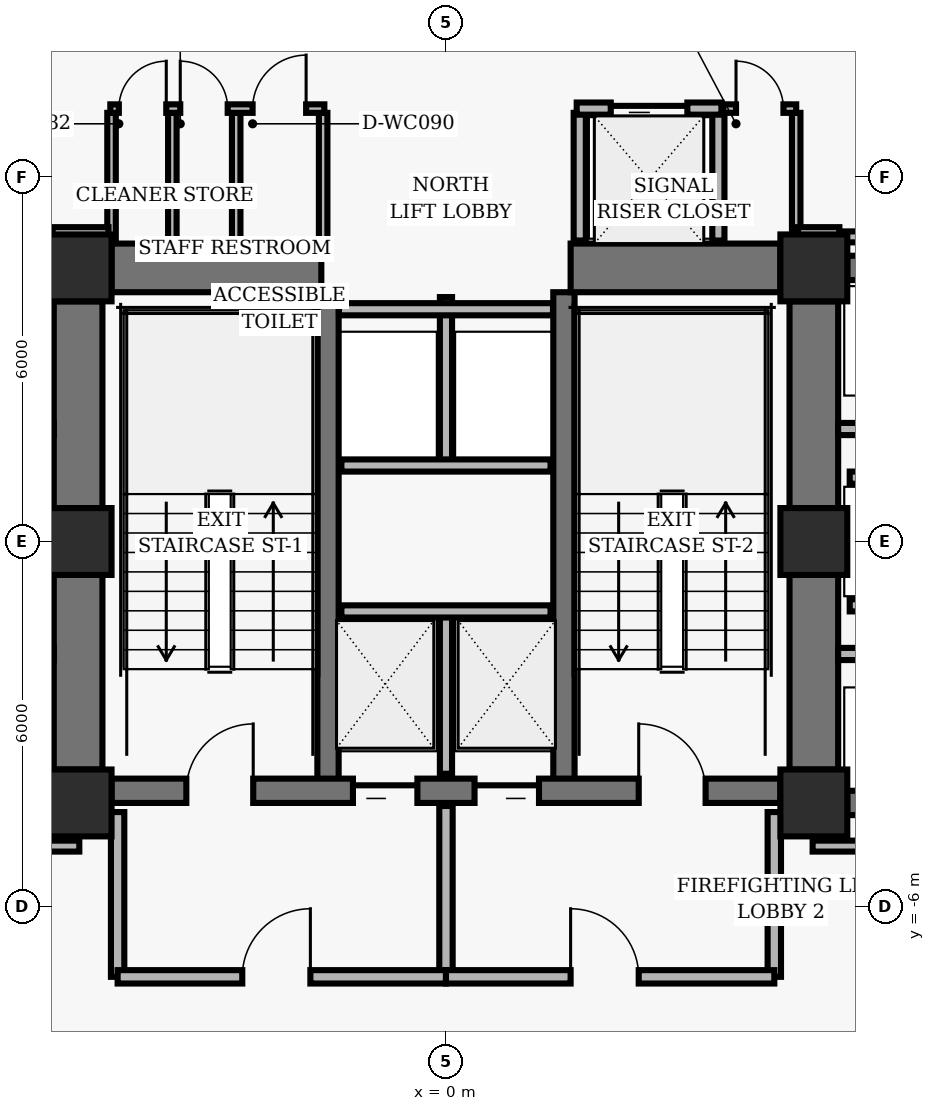
"""IFC4 building model, lengths in metres.
Left out: names, types, materials, properties, quantities, classifications, styles, units other than length and angle.
Written with IfcOpenShell. Run it as: python <this file> out.ifc"""

import sys

from ifc_helpers import new_model, si_unit, direction, frame, frame_2d, origin, origin_2d, place, context, subcontext, project, spatial, rectangle, hollow_rectangle, extrude, element, fill, save


model = new_model("IFC4")
c1 = context("Model", 3, precision=1e-05, world=origin(), true_north=direction((0.0, 1.0)))
c2 = subcontext(c1, "Body", "Model", "MODEL_VIEW")
j1 = project(units=[si_unit("LENGTHUNIT", "METRE"), si_unit("PLANEANGLEUNIT", "RADIAN")], contexts=[c1])
p1 = place(None, origin())
s1 = spatial("IfcSite", under=j1, at=p1, CompositionType="ELEMENT")
p2 = place(p1, origin())
s2 = spatial("IfcBuilding", under=s1, at=p2, CompositionType="ELEMENT")
p3 = place(p2, frame((0.0, 0.0, 11.84)))
s3 = spatial("IfcBuildingStorey", under=s2, at=p3, CompositionType="ELEMENT", Elevation=11.84)
for number, where, z_axis, x_axis in (
    (1, (-6.05, 4.5, 0.0), (0.0, 0.0, 1.0), (1.0, 0.0, 0.0)),
    (2, (6.05, 4.5, 0.0), (0.0, 0.0, 1.0), (1.0, 0.0, 0.0)),
    (3, (-6.05, 0.0, 0.0), (0.0, 0.0, 1.0), (1.0, 0.0, 0.0)),
    (4, (6.05, 0.0, 0.0), (0.0, 0.0, 1.0), (1.0, 0.0, 0.0)),
    (5, (-6.05, -4.3, 0.0), (0.0, 0.0, 1.0), (1.0, 0.0, 0.0)),
    (6, (6.05, -4.3, 0.0), (0.0, 0.0, 1.0), (1.0, 0.0, 0.0)),
):
    element("IfcColumn", number, at=place(p3, frame(where, z_axis=z_axis, x_axis=x_axis)), inside=s3, PredefinedType="COLUMN", context=c2, shape_type="SweptSolid", body=[
        extrude(hollow_rectangle(XDim=1.1, YDim=1.1, WallThickness=0.07, InnerFilletRadius=0.02, OuterFilletRadius=0.04, at=origin_2d()), origin(), (0.0, 0.0, 1.0), 3.52),
    ])
p4 = place(p3, frame((-6.05, 0.55, 0.0), z_axis=(0.0, 0.0, 1.0), x_axis=(0.0, 1.0, 0.0)))
e7 = element("IfcWall", 7, at=p4, inside=s3, PredefinedType="SHEAR", context=c2, shape_type="SweptSolid", body=[
    extrude(rectangle(XDim=3.4, YDim=0.8, at=frame_2d((1.7, 0.0))), origin(), (0.0, 0.0, 1.0), 3.178),
])
p5 = place(p3, frame((-6.05, -3.75, 0.0), z_axis=(0.0, 0.0, 1.0), x_axis=(0.0, 1.0, 0.0)))
e8 = element("IfcWall", 8, at=p5, inside=s3, PredefinedType="SHEAR", context=c2, shape_type="SweptSolid", body=[
    extrude(rectangle(XDim=3.2, YDim=0.8, at=frame_2d((1.6, 0.0))), origin(), (0.0, 0.0, 1.0), 3.178),
])
p6 = place(p3, frame((6.05, 0.55, 0.0), z_axis=(0.0, 0.0, 1.0), x_axis=(0.0, 1.0, 0.0)))
e9 = element("IfcWall", 9, at=p6, inside=s3, PredefinedType="SHEAR", context=c2, shape_type="SweptSolid", body=[
    extrude(rectangle(XDim=3.4, YDim=0.8, at=frame_2d((1.7, 0.0))), origin(), (0.0, 0.0, 1.0), 3.178),
])
p7 = place(p3, frame((6.05, -3.75, 0.0), z_axis=(0.0, 0.0, 1.0), x_axis=(0.0, 1.0, 0.0)))
e10 = element("IfcWall", 10, at=p7, inside=s3, PredefinedType="SHEAR", context=c2, shape_type="SweptSolid", body=[
    extrude(rectangle(XDim=3.2, YDim=0.8, at=frame_2d((1.6, 0.0))), origin(), (0.0, 0.0, 1.0), 3.178),
])
for number, where, z_axis, x_axis in (
    (11, (-1.94, -4.1, 0.0), (0.0, 0.0, 1.0), (0.0, 1.0, 0.0)),
    (12, (1.94, -4.1, 0.0), (0.0, 0.0, 1.0), (0.0, 1.0, 0.0)),
):
    element("IfcWall", number, at=place(p3, frame(where, z_axis=z_axis, x_axis=x_axis)), inside=s3, PredefinedType="SHEAR", context=c2, shape_type="SweptSolid", body=[
        extrude(rectangle(XDim=8.2, YDim=0.35, at=frame_2d((4.1, 0.0))), origin(), (0.0, 0.0, 1.0), 3.178),
    ])
p8 = place(p3, frame((-5.5, -4.1, 0.0), z_axis=(0.0, 0.0, 1.0), x_axis=(1.0, 0.0, 0.0)))
e13 = element("IfcWall", 13, at=p8, inside=s3, PredefinedType="SHEAR", context=c2, shape_type="SweptSolid", body=[
    extrude(rectangle(XDim=11.0, YDim=0.4, at=frame_2d((5.5, 0.0))), origin(), (0.0, 0.0, 1.0), 3.178),
])
p9 = place(p8, frame((1.23, 0.0, 0.0)))
e14 = element("IfcOpeningElement", 14, at=p9, cuts=e13, PredefinedType="OPENING", context=c2, shape_type="SweptSolid", body=[
    extrude(rectangle(XDim=1.1, YDim=2.04, at=frame_2d((0.55, 1.02))), frame((0.0, 0.21, 0.0), z_axis=(0.0, -1.0, 0.0), x_axis=(1.0, 0.0, 0.0)), (0.0, 0.0, 1.0), 0.42),
])
p10 = place(p8, frame((8.67, 0.0, 0.0)))
e15 = element("IfcOpeningElement", 15, at=p10, cuts=e13, PredefinedType="OPENING", context=c2, shape_type="SweptSolid", body=[
    extrude(rectangle(XDim=1.1, YDim=2.04, at=frame_2d((0.55, 1.02))), frame((0.0, 0.21, 0.0), z_axis=(0.0, -1.0, 0.0), x_axis=(1.0, 0.0, 0.0)), (0.0, 0.0, 1.0), 0.42),
])
p11 = place(p8, frame((3.97, 0.0, 0.0)))
e16 = element("IfcOpeningElement", 16, at=p11, cuts=e13, PredefinedType="OPENING", context=c2, shape_type="SweptSolid", body=[
    extrude(rectangle(XDim=1.06, YDim=2.04, at=frame_2d((0.53, 1.02))), frame((0.0, 0.21, 0.0), z_axis=(0.0, -1.0, 0.0), x_axis=(1.0, 0.0, 0.0)), (0.0, 0.0, 1.0), 0.42),
])
p12 = place(p8, frame((5.97, 0.0, 0.0)))
e17 = element("IfcOpeningElement", 17, at=p12, cuts=e13, PredefinedType="OPENING", context=c2, shape_type="SweptSolid", body=[
    extrude(rectangle(XDim=1.06, YDim=2.04, at=frame_2d((0.53, 1.02))), frame((0.0, 0.21, 0.0), z_axis=(0.0, -1.0, 0.0), x_axis=(1.0, 0.0, 0.0)), (0.0, 0.0, 1.0), 0.42),
])
for number, where, z_axis, x_axis in (
    (18, (-5.5, 4.5, 0.0), (0.0, 0.0, 1.0), (1.0, 0.0, 0.0)),
    (19, (2.05, 4.5, 0.0), (0.0, 0.0, 1.0), (1.0, 0.0, 0.0)),
):
    element("IfcWall", number, at=place(p3, frame(where, z_axis=z_axis, x_axis=x_axis)), inside=s3, PredefinedType="SHEAR", context=c2, shape_type="SweptSolid", body=[
        extrude(rectangle(XDim=3.45, YDim=0.8, at=frame_2d((1.725, 0.0))), origin(), (0.0, 0.0, 1.0), 3.178),
    ])
for number, where, z_axis, x_axis in (
    (20, (6.6, 4.5, 0.0), (0.0, 0.0, 1.0), (1.0, 0.0, 0.0)),
    (21, (6.6, -4.3, 0.0), (0.0, 0.0, 1.0), (1.0, 0.0, 0.0)),
):
    element("IfcWall", number, at=place(p3, frame(where, z_axis=z_axis, x_axis=x_axis)), inside=s3, PredefinedType="SHEAR", context=c2, shape_type="SweptSolid", body=[
        extrude(rectangle(XDim=1.8, YDim=0.4, at=frame_2d((0.9, 0.0))), origin(), (0.0, 0.0, 1.0), 3.178),
    ])
p13 = place(p3, frame((0.0, -3.82, 0.0), z_axis=(0.0, 0.0, 1.0), x_axis=(0.0, 1.0, 0.0)))
e22 = element("IfcWall", 22, at=p13, inside=s3, PredefinedType="PARTITIONING", context=c2, shape_type="SweptSolid", body=[
    extrude(rectangle(XDim=2.67, YDim=0.2, at=frame_2d((1.335, 0.0))), origin(), (0.0, 0.0, 1.0), 3.153),
])
p14 = place(p3, frame((-1.72, -1.15, 0.0), z_axis=(0.0, 0.0, 1.0), x_axis=(1.0, 0.0, 0.0)))
e23 = element("IfcWall", 23, at=p14, inside=s3, PredefinedType="PARTITIONING", context=c2, shape_type="SweptSolid", body=[
    extrude(rectangle(XDim=3.44, YDim=0.2, at=frame_2d((1.72, 0.0))), origin(), (0.0, 0.0, 1.0), 3.153),
])
for number, where, z_axis, x_axis in (
    (24, (-5.4, -7.16, 0.0), (0.0, 0.0, 1.0), (0.0, 1.0, 0.0)),
    (25, (5.4, -7.16, 0.0), (0.0, 0.0, 1.0), (0.0, 1.0, 0.0)),
):
    element("IfcWall", number, at=place(p3, frame(where, z_axis=z_axis, x_axis=x_axis)), inside=s3, PredefinedType="PARTITIONING", context=c2, shape_type="SweptSolid", body=[
        extrude(rectangle(XDim=2.71, YDim=0.22, at=frame_2d((1.355, 0.0))), origin(), (0.0, 0.0, 1.0), 3.153),
    ])
p15 = place(p3, frame((0.0, -7.16, 0.0), z_axis=(0.0, 0.0, 1.0), x_axis=(0.0, 1.0, 0.0)))
e26 = element("IfcWall", 26, at=p15, inside=s3, PredefinedType="PARTITIONING", context=c2, shape_type="SweptSolid", body=[
    extrude(rectangle(XDim=2.81, YDim=0.22, at=frame_2d((1.405, 0.0))), origin(), (0.0, 0.0, 1.0), 3.153),
])
p16 = place(p3, frame((-5.4, -7.16, 0.0), z_axis=(0.0, 0.0, 1.0), x_axis=(1.0, 0.0, 0.0)))
e27 = element("IfcWall", 27, at=p16, inside=s3, PredefinedType="PARTITIONING", context=c2, shape_type="SweptSolid", body=[
    extrude(rectangle(XDim=5.4, YDim=0.22, at=frame_2d((2.7, 0.0))), origin(), (0.0, 0.0, 1.0), 3.153),
])
p17 = place(p16, frame((2.05, 0.0, 0.0)))
e28 = element("IfcOpeningElement", 28, at=p17, cuts=e27, PredefinedType="OPENING", context=c2, shape_type="SweptSolid", body=[
    extrude(rectangle(XDim=1.12, YDim=2.02, at=frame_2d((0.56, 1.01))), frame((0.0, 0.12, 0.0), z_axis=(0.0, -1.0, 0.0), x_axis=(1.0, 0.0, 0.0)), (0.0, 0.0, 1.0), 0.24),
])
p18 = place(p3, frame((0.0, -7.16, 0.0), z_axis=(0.0, 0.0, 1.0), x_axis=(1.0, 0.0, 0.0)))
e29 = element("IfcWall", 29, at=p18, inside=s3, PredefinedType="PARTITIONING", context=c2, shape_type="SweptSolid", body=[
    extrude(rectangle(XDim=5.4, YDim=0.22, at=frame_2d((2.7, 0.0))), origin(), (0.0, 0.0, 1.0), 3.153),
])
p19 = place(p18, frame((2.05, 0.0, 0.0)))
e30 = element("IfcOpeningElement", 30, at=p19, cuts=e29, PredefinedType="OPENING", context=c2, shape_type="SweptSolid", body=[
    extrude(rectangle(XDim=1.12, YDim=2.02, at=frame_2d((0.56, 1.01))), frame((0.0, 0.12, 0.0), z_axis=(0.0, -1.0, 0.0), x_axis=(1.0, 0.0, 0.0)), (0.0, 0.0, 1.0), 0.24),
])
p20 = place(p3, frame((0.0, 1.25, 0.0), z_axis=(0.0, 0.0, 1.0), x_axis=(0.0, 1.0, 0.0)))
e31 = element("IfcWall", 31, at=p20, inside=s3, PredefinedType="PARTITIONING", context=c2, shape_type="SweptSolid", body=[
    extrude(rectangle(XDim=2.77, YDim=0.2, at=frame_2d((1.385, 0.0))), origin(), (0.0, 0.0, 1.0), 3.153),
])
p21 = place(p3, frame((-1.72, 1.25, 0.0), z_axis=(0.0, 0.0, 1.0), x_axis=(1.0, 0.0, 0.0)))
e32 = element("IfcWall", 32, at=p21, inside=s3, PredefinedType="PARTITIONING", context=c2, shape_type="SweptSolid", body=[
    extrude(rectangle(XDim=3.44, YDim=0.2, at=frame_2d((1.72, 0.0))), origin(), (0.0, 0.0, 1.0), 3.153),
])
p22 = place(p3, frame((-1.76, 3.82, 0.0), z_axis=(0.0, 0.0, 1.0), x_axis=(1.0, 0.0, 0.0)))
e33 = element("IfcWall", 33, at=p22, inside=s3, PredefinedType="PARTITIONING", context=c2, shape_type="SweptSolid", body=[
    extrude(rectangle(XDim=3.52, YDim=0.2, at=frame_2d((1.76, 0.0))), origin(), (0.0, 0.0, 1.0), 3.153),
])
for number, where, z_axis, x_axis in (
    (34, (2.2, 4.95, 0.0), (0.0, 0.0, 1.0), (0.0, 1.0, 0.0)),
    (35, (4.48, 4.95, 0.0), (0.0, 0.0, 1.0), (0.0, 1.0, 0.0)),
):
    element("IfcWall", number, at=place(p3, frame(where, z_axis=z_axis, x_axis=x_axis)), inside=s3, PredefinedType="PARTITIONING", context=c2, shape_type="SweptSolid", body=[
        extrude(rectangle(XDim=2.1, YDim=0.2, at=frame_2d((1.05, 0.0))), origin(), (0.0, 0.0, 1.0), 3.153),
    ])
p23 = place(p3, frame((2.15, 7.12, 0.0), z_axis=(0.0, 0.0, 1.0), x_axis=(1.0, 0.0, 0.0)))
e36 = element("IfcWall", 36, at=p23, inside=s3, PredefinedType="PARTITIONING", context=c2, shape_type="SweptSolid", body=[
    extrude(rectangle(XDim=2.38, YDim=0.2, at=frame_2d((1.19, 0.0))), origin(), (0.0, 0.0, 1.0), 3.153),
])
p24 = place(p23, frame((0.56, 0.0, 0.0)))
e37 = element("IfcOpeningElement", 37, at=p24, cuts=e36, PredefinedType="OPENING", context=c2, shape_type="SweptSolid", body=[
    extrude(rectangle(XDim=1.26, YDim=2.06, at=frame_2d((0.63, 1.03))), frame((0.0, 0.11, 0.0), z_axis=(0.0, -1.0, 0.0), x_axis=(1.0, 0.0, 0.0)), (0.0, 0.0, 1.0), 0.22),
])
for number, where, z_axis, x_axis in (
    (38, (-5.5, 4.95, 0.0), (0.0, 0.0, 1.0), (0.0, 1.0, 0.0)),
    (39, (-4.5, 4.95, 0.0), (0.0, 0.0, 1.0), (0.0, 1.0, 0.0)),
    (40, (-3.45, 4.95, 0.0), (0.0, 0.0, 1.0), (0.0, 1.0, 0.0)),
    (41, (-2.02, 4.95, 0.0), (0.0, 0.0, 1.0), (0.0, 1.0, 0.0)),
):
    element("IfcWall", number, at=place(p3, frame(where, z_axis=z_axis, x_axis=x_axis)), inside=s3, PredefinedType="PARTITIONING", context=c2, shape_type="SweptSolid", body=[
        extrude(rectangle(XDim=2.1, YDim=0.14, at=frame_2d((1.05, 0.0))), origin(), (0.0, 0.0, 1.0), 3.153),
    ])
p25 = place(p3, frame((-5.52, 7.12, 0.0), z_axis=(0.0, 0.0, 1.0), x_axis=(1.0, 0.0, 0.0)))
e42 = element("IfcWall", 42, at=p25, inside=s3, PredefinedType="PARTITIONING", context=c2, shape_type="SweptSolid", body=[
    extrude(rectangle(XDim=3.52, YDim=0.14, at=frame_2d((1.76, 0.0))), origin(), (0.0, 0.0, 1.0), 3.153),
])
p26 = place(p25, frame((0.14, 0.0, 0.0)))
e43 = element("IfcOpeningElement", 43, at=p26, cuts=e42, PredefinedType="OPENING", context=c2, shape_type="SweptSolid", body=[
    extrude(rectangle(XDim=0.78, YDim=2.01, at=frame_2d((0.39, 1.005))), frame((0.0, 0.08, 0.0), z_axis=(0.0, -1.0, 0.0), x_axis=(1.0, 0.0, 0.0)), (0.0, 0.0, 1.0), 0.16),
])
p27 = place(p25, frame((1.15, 0.0, 0.0)))
e44 = element("IfcOpeningElement", 44, at=p27, cuts=e42, PredefinedType="OPENING", context=c2, shape_type="SweptSolid", body=[
    extrude(rectangle(XDim=0.78, YDim=2.01, at=frame_2d((0.39, 1.005))), frame((0.0, 0.08, 0.0), z_axis=(0.0, -1.0, 0.0), x_axis=(1.0, 0.0, 0.0)), (0.0, 0.0, 1.0), 0.16),
])
p28 = place(p25, frame((2.34, 0.0, 0.0)))
e45 = element("IfcOpeningElement", 45, at=p28, cuts=e42, PredefinedType="OPENING", context=c2, shape_type="SweptSolid", body=[
    extrude(rectangle(XDim=0.88, YDim=2.02, at=frame_2d((0.44, 1.01))), frame((0.0, 0.08, 0.0), z_axis=(0.0, -1.0, 0.0), x_axis=(1.0, 0.0, 0.0)), (0.0, 0.0, 1.0), 0.16),
])
p29 = place(p3, frame((5.76, 4.95, 0.0), z_axis=(0.0, 0.0, 1.0), x_axis=(0.0, 1.0, 0.0)))
e46 = element("IfcWall", 46, at=p29, inside=s3, PredefinedType="PARTITIONING", context=c2, shape_type="SweptSolid", body=[
    extrude(rectangle(XDim=2.1, YDim=0.14, at=frame_2d((1.05, 0.0))), origin(), (0.0, 0.0, 1.0), 2.206),
])
p30 = place(p3, frame((4.56, 7.12, 0.0), z_axis=(0.0, 0.0, 1.0), x_axis=(1.0, 0.0, 0.0)))
e47 = element("IfcWall", 47, at=p30, inside=s3, PredefinedType="PARTITIONING", context=c2, shape_type="SweptSolid", body=[
    extrude(rectangle(XDim=1.2, YDim=0.14, at=frame_2d((0.6, 0.0))), origin(), (0.0, 0.0, 1.0), 3.153),
])
p31 = place(p30, frame((0.21, 0.0, 0.0)))
e48 = element("IfcOpeningElement", 48, at=p31, cuts=e47, PredefinedType="OPENING", context=c2, shape_type="SweptSolid", body=[
    extrude(rectangle(XDim=0.78, YDim=2.01, at=frame_2d((0.39, 1.005))), frame((0.0, 0.08, 0.0), z_axis=(0.0, -1.0, 0.0), x_axis=(1.0, 0.0, 0.0)), (0.0, 0.0, 1.0), 0.16),
])
for number, where, z_axis, x_axis in (
    (49, (-8.55, -1.85, 0.0), (0.0, 0.0, 1.0), (1.0, 0.0, 0.0)),
    (50, (-8.55, 1.85, 0.0), (0.0, 0.0, 1.0), (1.0, 0.0, 0.0)),
    (51, (6.45, -1.85, 0.0), (0.0, 0.0, 1.0), (1.0, 0.0, 0.0)),
    (52, (6.45, 1.85, 0.0), (0.0, 0.0, 1.0), (1.0, 0.0, 0.0)),
):
    element("IfcWall", number, at=place(p3, frame(where, z_axis=z_axis, x_axis=x_axis)), inside=s3, PredefinedType="PARTITIONING", context=c2, shape_type="SweptSolid", body=[
        extrude(rectangle(XDim=2.1, YDim=0.2, at=frame_2d((1.05, 0.0))), origin(), (0.0, 0.0, 1.0), 3.153),
    ])
for number, where, z_axis, x_axis in (
    (53, (6.64, -1.05, 0.0), (0.0, 0.0, 1.0), (1.0, 0.0, 0.0)),
    (54, (6.64, 1.05, 0.0), (0.0, 0.0, 1.0), (1.0, 0.0, 0.0)),
):
    element("IfcWall", number, at=place(p3, frame(where, z_axis=z_axis, x_axis=x_axis)), inside=s3, PredefinedType="PARTITIONING", context=c2, shape_type="SweptSolid", body=[
        extrude(rectangle(XDim=1.91, YDim=0.2, at=frame_2d((0.955, 0.0))), origin(), (0.0, 0.0, 1.0), 3.153),
    ])
for number, where, z_axis, x_axis in (
    (55, (-9.37, -5.01, 0.0), (0.0, 0.0, 1.0), (1.0, 0.0, 0.0)),
    (56, (6.03, -5.01, 0.0), (0.0, 0.0, 1.0), (1.0, 0.0, 0.0)),
):
    element("IfcWall", number, at=place(p3, frame(where, z_axis=z_axis, x_axis=x_axis)), inside=s3, PredefinedType="PARTITIONING", context=c2, shape_type="SweptSolid", body=[
        extrude(rectangle(XDim=3.34, YDim=0.18, at=frame_2d((1.67, 0.0))), origin(), (0.0, 0.0, 1.0), 3.153),
    ])
p32 = place(p3, frame((9.37, 5.01, 0.0), z_axis=(0.0, 0.0, 1.0), x_axis=(-1.0, 0.0, 0.0)))
e57 = element("IfcWall", 57, at=p32, inside=s3, PredefinedType="PARTITIONING", context=c2, shape_type="SweptSolid", body=[
    extrude(rectangle(XDim=2.808, YDim=0.18, at=frame_2d((1.404, 0.0))), origin(), (0.0, 0.0, 1.0), 3.153),
])
p33 = place(p3, frame((6.47, 5.08, 0.0), z_axis=(0.0, 0.0, 1.0), x_axis=(-1.0, 0.0, 0.0)))
e58 = element("IfcWall", 58, at=p33, inside=s3, PredefinedType="PARTITIONING", context=c2, shape_type="SweptSolid", body=[
    extrude(rectangle(XDim=0.68, YDim=0.18, at=frame_2d((0.34, 0.0))), origin(), (0.0, 0.0, 1.0), 3.153),
])
p34 = place(p3, frame((-5.55, 5.08, 0.0), z_axis=(0.0, 0.0, 1.0), x_axis=(-1.0, 0.0, 0.0)))
e59 = element("IfcWall", 59, at=p34, inside=s3, PredefinedType="PARTITIONING", context=c2, shape_type="SweptSolid", body=[
    extrude(rectangle(XDim=0.92, YDim=0.18, at=frame_2d((0.46, 0.0))), origin(), (0.0, 0.0, 1.0), 3.153),
])
p35 = place(p9, origin())
e60 = element("IfcDoor", 60, at=p35, inside=s3, OperationType="SINGLE_SWING_RIGHT", PredefinedType="DOOR", context=c2, shape_type="SweptSolid", body=[
    extrude(rectangle(XDim=1.1, YDim=2.04, at=frame_2d((0.55, 1.02))), frame((0.0, 0.025, 0.0), z_axis=(0.0, -1.0, 0.0), x_axis=(1.0, 0.0, 0.0)), (0.0, 0.0, 1.0), 0.05),
])
fill(e14, e60)
p36 = place(p10, origin())
e61 = element("IfcDoor", 61, at=p36, inside=s3, OperationType="SINGLE_SWING_LEFT", PredefinedType="DOOR", context=c2, shape_type="SweptSolid", body=[
    extrude(rectangle(XDim=1.1, YDim=2.04, at=frame_2d((0.55, 1.02))), frame((0.0, 0.025, 0.0), z_axis=(0.0, -1.0, 0.0), x_axis=(1.0, 0.0, 0.0)), (0.0, 0.0, 1.0), 0.05),
])
fill(e15, e61)
p37 = place(p11, origin())
e62 = element("IfcDoor", 62, at=p37, inside=s3, OperationType="SLIDING_TO_LEFT", PredefinedType="DOOR", context=c2, shape_type="SweptSolid", body=[
    extrude(rectangle(XDim=1.06, YDim=2.04, at=frame_2d((0.53, 1.02))), frame((0.0, 0.025, 0.0), z_axis=(0.0, -1.0, 0.0), x_axis=(1.0, 0.0, 0.0)), (0.0, 0.0, 1.0), 0.05),
])
fill(e16, e62)
p38 = place(p12, origin())
e63 = element("IfcDoor", 63, at=p38, inside=s3, OperationType="SLIDING_TO_RIGHT", PredefinedType="DOOR", context=c2, shape_type="SweptSolid", body=[
    extrude(rectangle(XDim=1.06, YDim=2.04, at=frame_2d((0.53, 1.02))), frame((0.0, 0.025, 0.0), z_axis=(0.0, -1.0, 0.0), x_axis=(1.0, 0.0, 0.0)), (0.0, 0.0, 1.0), 0.05),
])
fill(e17, e63)
p39 = place(p17, origin())
e64 = element("IfcDoor", 64, at=p39, inside=s3, OperationType="SINGLE_SWING_RIGHT", PredefinedType="DOOR", context=c2, shape_type="SweptSolid", body=[
    extrude(rectangle(XDim=1.12, YDim=2.02, at=frame_2d((0.56, 1.01))), frame((0.0, 0.025, 0.0), z_axis=(0.0, -1.0, 0.0), x_axis=(1.0, 0.0, 0.0)), (0.0, 0.0, 1.0), 0.05),
])
fill(e28, e64)
p40 = place(p19, origin())
e65 = element("IfcDoor", 65, at=p40, inside=s3, OperationType="SINGLE_SWING_LEFT", PredefinedType="DOOR", context=c2, shape_type="SweptSolid", body=[
    extrude(rectangle(XDim=1.12, YDim=2.02, at=frame_2d((0.56, 1.01))), frame((0.0, 0.025, 0.0), z_axis=(0.0, -1.0, 0.0), x_axis=(1.0, 0.0, 0.0)), (0.0, 0.0, 1.0), 0.05),
])
fill(e30, e65)
p41 = place(p24, origin())
e66 = element("IfcDoor", 66, at=p41, inside=s3, OperationType="SLIDING_TO_LEFT", PredefinedType="DOOR", context=c2, shape_type="SweptSolid", body=[
    extrude(rectangle(XDim=1.26, YDim=2.06, at=frame_2d((0.63, 1.03))), frame((0.0, 0.025, 0.0), z_axis=(0.0, -1.0, 0.0), x_axis=(1.0, 0.0, 0.0)), (0.0, 0.0, 1.0), 0.05),
])
fill(e37, e66)
p42 = place(p26, origin())
e67 = element("IfcDoor", 67, at=p42, inside=s3, OperationType="SINGLE_SWING_RIGHT", PredefinedType="DOOR", context=c2, shape_type="SweptSolid", body=[
    extrude(rectangle(XDim=0.78, YDim=2.01, at=frame_2d((0.39, 1.005))), frame((0.0, 0.025, 0.0), z_axis=(0.0, -1.0, 0.0), x_axis=(1.0, 0.0, 0.0)), (0.0, 0.0, 1.0), 0.05),
])
fill(e43, e67)
p43 = place(p27, origin())
e68 = element("IfcDoor", 68, at=p43, inside=s3, OperationType="SINGLE_SWING_LEFT", PredefinedType="DOOR", context=c2, shape_type="SweptSolid", body=[
    extrude(rectangle(XDim=0.78, YDim=2.01, at=frame_2d((0.39, 1.005))), frame((0.0, 0.025, 0.0), z_axis=(0.0, -1.0, 0.0), x_axis=(1.0, 0.0, 0.0)), (0.0, 0.0, 1.0), 0.05),
])
fill(e44, e68)
p44 = place(p28, origin())
e69 = element("IfcDoor", 69, at=p44, inside=s3, OperationType="SINGLE_SWING_RIGHT", PredefinedType="DOOR", context=c2, shape_type="SweptSolid", body=[
    extrude(rectangle(XDim=0.88, YDim=2.02, at=frame_2d((0.44, 1.01))), frame((0.0, 0.025, 0.0), z_axis=(0.0, -1.0, 0.0), x_axis=(1.0, 0.0, 0.0)), (0.0, 0.0, 1.0), 0.05),
])
fill(e45, e69)
p45 = place(p31, origin())
e70 = element("IfcDoor", 70, at=p45, inside=s3, OperationType="SINGLE_SWING_LEFT", PredefinedType="DOOR", context=c2, shape_type="SweptSolid", body=[
    extrude(rectangle(XDim=0.78, YDim=2.01, at=frame_2d((0.39, 1.005))), frame((0.0, 0.025, 0.0), z_axis=(0.0, -1.0, 0.0), x_axis=(1.0, 0.0, 0.0)), (0.0, 0.0, 1.0), 0.05),
])
fill(e48, e70)
save(model, sys.argv[1])
